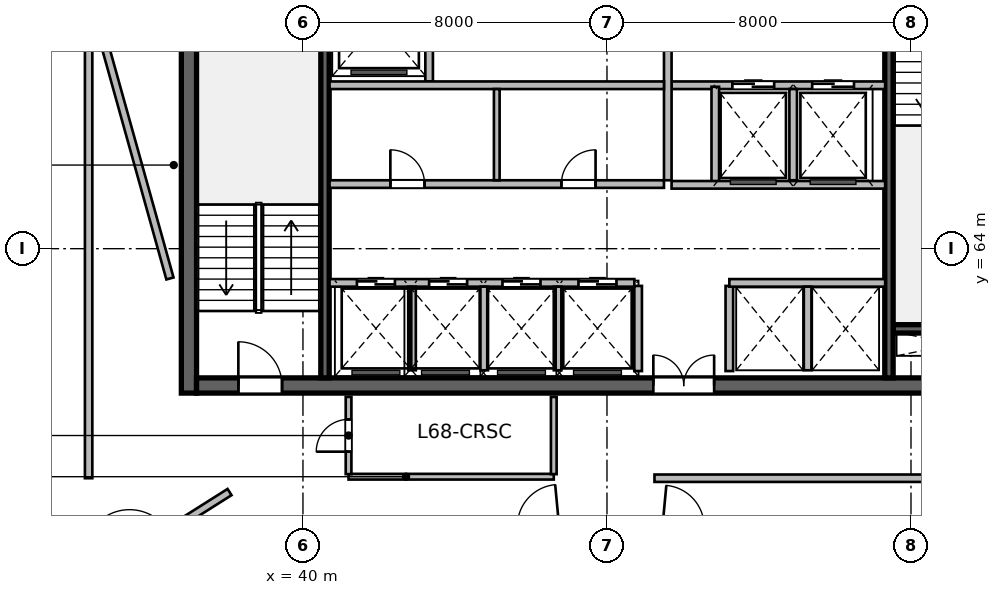
"""IFC4 building model, lengths in metres.
Left out: names, types, materials, properties, quantities, classifications, styles, units other than length and angle.
Written with IfcOpenShell. Run it as: python <this file> out.ifc"""

import sys

from ifc_helpers import new_model, si_unit, direction, frame, frame_2d, origin, place, context, subcontext, project, spatial, rectangle, extrude, source, transform, mapped, element, fill, save


model = new_model("IFC4")
c1 = context("Model", 3, precision=1e-05, world=origin(), true_north=direction((0.0, 1.0)))
c2 = subcontext(c1, "Body", "Model", "MODEL_VIEW")
j1 = project(units=[si_unit("LENGTHUNIT", "METRE"), si_unit("PLANEANGLEUNIT", "RADIAN")], contexts=[c1])
p1 = place(None, origin())
s1 = spatial("IfcSite", under=j1, at=p1, CompositionType="ELEMENT")
p2 = place(p1, origin())
s2 = spatial("IfcBuilding", under=s1, at=p2, CompositionType="ELEMENT")
p3 = place(p2, frame((0.0, 0.0, 279.6)))
s3 = spatial("IfcBuildingStorey", under=s2, at=p3, CompositionType="ELEMENT", Elevation=279.6)
m1 = source(origin(), c2, "Body", "SweptSolid", [
    extrude(rectangle(XDim=12.0, YDim=0.4, at=frame_2d((6.0, 0.0))), origin(), (0.0, 0.0, 1.0), 3.9),
])
p4 = place(p3, frame((37.0, 60.2, 0.0), z_axis=(0.0, 0.0, 1.0), x_axis=(0.0, 1.0, 0.0)))
e1 = element("IfcWall", 1, at=p4, inside=s3, PredefinedType="SHEAR", context=c2, shape_type="MappedRepresentation", body=[
    mapped(m1, transform((0.0, 0.0, 0.0), scale=1.0)),
])
m2 = source(origin(), c2, "Body", "SweptSolid", [
    extrude(rectangle(XDim=21.6, YDim=0.4, at=frame_2d((10.8, 0.0))), origin(), (0.0, 0.0, 1.0), 3.9),
])
p5 = place(p3, frame((37.2, 60.4, 0.0), z_axis=(0.0, 0.0, 1.0), x_axis=(1.0, 0.0, 0.0)))
e2 = element("IfcWall", 2, at=p5, inside=s3, PredefinedType="SHEAR", context=c2, shape_type="MappedRepresentation", body=[
    mapped(m2, transform((0.0, 0.0, 0.0), scale=1.0)),
])
p6 = place(p5, frame((1.1, 0.0, 0.0)))
e3 = element("IfcOpeningElement", 3, at=p6, cuts=e2, PredefinedType="OPENING", context=c2, shape_type="SweptSolid", body=[
    extrude(rectangle(XDim=1.15, YDim=2.15, at=frame_2d((0.575, 1.075))), frame((0.0, 0.21, 0.0), z_axis=(0.0, -1.0, 0.0), x_axis=(1.0, 0.0, 0.0)), (0.0, 0.0, 1.0), 0.42),
])
p7 = place(p5, frame((19.5, 0.0, 0.0)))
e4 = element("IfcOpeningElement", 4, at=p7, cuts=e2, PredefinedType="OPENING", context=c2, shape_type="SweptSolid", body=[
    extrude(rectangle(XDim=0.9, YDim=2.1, at=frame_2d((0.45, 1.05))), frame((0.0, 0.21, 0.0), z_axis=(0.0, -1.0, 0.0), x_axis=(1.0, 0.0, 0.0)), (0.0, 0.0, 1.0), 0.42),
])
p8 = place(p5, frame((12.02, 0.0, 0.0)))
e5 = element("IfcOpeningElement", 5, at=p8, cuts=e2, PredefinedType="OPENING", context=c2, shape_type="SweptSolid", body=[
    extrude(rectangle(XDim=1.6, YDim=2.15, at=frame_2d((0.8, 1.075))), frame((0.0, 0.21, 0.0), z_axis=(0.0, -1.0, 0.0), x_axis=(1.0, 0.0, 0.0)), (0.0, 0.0, 1.0), 0.42),
])
m3 = source(origin(), c2, "Body", "SweptSolid", [
    extrude(rectangle(XDim=3.27, YDim=0.22, at=frame_2d((1.635, 0.0))), origin(), (0.0, 0.0, 1.0), 3.9),
])
p9 = place(p3, frame((55.53, 61.89, 0.0), z_axis=(0.0, 0.0, 1.0), x_axis=(1.0, 0.0, 0.0)))
e6 = element("IfcWall", 6, at=p9, inside=s3, PredefinedType="SHEAR", context=c2, shape_type="MappedRepresentation", body=[
    mapped(m3, transform((0.0, 0.0, 0.0), scale=1.0)),
])
m4 = source(origin(), c2, "Body", "SweptSolid", [
    extrude(rectangle(XDim=11.2, YDim=0.22, at=frame_2d((5.6, 0.0))), origin(), (0.0, 0.0, 1.0), 3.9),
])
p10 = place(p3, frame((40.58, 60.6, 0.0), z_axis=(0.0, 0.0, 1.0), x_axis=(0.0, 1.0, 0.0)))
e7 = element("IfcWall", 7, at=p10, inside=s3, PredefinedType="SHEAR", context=c2, shape_type="MappedRepresentation", body=[
    mapped(m4, transform((0.0, 0.0, 0.0), scale=1.0)),
])
p11 = place(p3, frame((55.42, 60.6, 0.0), z_axis=(0.0, 0.0, 1.0), x_axis=(0.0, 1.0, 0.0)))
e8 = element("IfcWall", 8, at=p11, inside=s3, PredefinedType="SHEAR", context=c2, shape_type="MappedRepresentation", body=[
    mapped(m4, transform((0.0, 0.0, 0.0), scale=1.0)),
])
p12 = place(p11, frame((9.645, 0.0, 0.0)))
e9 = element("IfcOpeningElement", 9, at=p12, cuts=e8, PredefinedType="OPENING", context=c2, shape_type="SweptSolid", body=[
    extrude(rectangle(XDim=1.15, YDim=2.15, at=frame_2d((0.575, 1.075))), frame((0.0, 0.12, 0.0), z_axis=(0.0, -1.0, 0.0), x_axis=(1.0, 0.0, 0.0)), (0.0, 0.0, 1.0), 0.24),
])
m5 = source(origin(), c2, "Body", "SweptSolid", [
    extrude(rectangle(XDim=2.24, YDim=0.2, at=frame_2d((1.12, 0.0))), origin(), (0.0, 0.0, 1.0), 3.64),
])
for number, where, z_axis, x_axis in (
    (10, (48.82, 60.78, 0.0), (0.0, 0.0, 1.0), (0.0, 1.0, 0.0)),
    (11, (51.22, 60.78, 0.0), (0.0, 0.0, 1.0), (0.0, 1.0, 0.0)),
):
    element("IfcWall", number, at=place(p3, frame(where, z_axis=z_axis, x_axis=x_axis)), inside=s3, PredefinedType="SOLIDWALL", context=c2, shape_type="MappedRepresentation", body=[
        mapped(m5, transform((0.0, 0.0, 0.0), scale=1.0)),
    ])
m6 = source(origin(), c2, "Body", "SweptSolid", [
    extrude(rectangle(XDim=5.62, YDim=0.2, at=frame_2d((2.81, 0.0))), origin(), (0.0, 0.0, 1.0), 3.64),
])
p13 = place(p3, frame((49.7, 68.3, 0.0), z_axis=(0.0, 0.0, 1.0), x_axis=(1.0, 0.0, 0.0)))
e12 = element("IfcWall", 12, at=p13, inside=s3, PredefinedType="SOLIDWALL", context=c2, shape_type="MappedRepresentation", body=[
    mapped(m6, transform((0.0, 0.0, 0.0), scale=1.0)),
])
p14 = place(p13, frame((1.6, 0.0, 0.0)))
e13 = element("IfcOpeningElement", 13, at=p14, cuts=e12, PredefinedType="OPENING", context=c2, shape_type="SweptSolid", body=[
    extrude(rectangle(XDim=1.1, YDim=2.15, at=frame_2d((0.55, 1.075))), frame((0.0, 0.11, 0.0), z_axis=(0.0, -1.0, 0.0), x_axis=(1.0, 0.0, 0.0)), (0.0, 0.0, 1.0), 0.22),
])
p15 = place(p13, frame((3.7, 0.0, 0.0)))
e14 = element("IfcOpeningElement", 14, at=p15, cuts=e12, PredefinedType="OPENING", context=c2, shape_type="SweptSolid", body=[
    extrude(rectangle(XDim=1.1, YDim=2.15, at=frame_2d((0.55, 1.075))), frame((0.0, 0.11, 0.0), z_axis=(0.0, -1.0, 0.0), x_axis=(1.0, 0.0, 0.0)), (0.0, 0.0, 1.0), 0.22),
])
m7 = source(origin(), c2, "Body", "SweptSolid", [
    extrude(rectangle(XDim=5.8, YDim=0.2, at=frame_2d((2.9, 0.0))), origin(), (0.0, 0.0, 1.0), 3.64),
])
p16 = place(p3, frame((49.6, 65.8, 0.0), z_axis=(0.0, 0.0, 1.0), x_axis=(0.0, 1.0, 0.0)))
e15 = element("IfcWall", 15, at=p16, inside=s3, PredefinedType="SOLIDWALL", context=c2, shape_type="MappedRepresentation", body=[
    mapped(m7, transform((0.0, 0.0, 0.0), scale=1.0)),
])
m8 = source(origin(), c2, "Body", "SweptSolid", [
    extrude(rectangle(XDim=2.58, YDim=0.2, at=frame_2d((1.29, 0.0))), origin(), (0.0, 0.0, 1.0), 3.64),
])
p17 = place(p3, frame((50.85, 65.68, 0.0), z_axis=(0.0, 0.0, 1.0), x_axis=(0.0, 1.0, 0.0)))
e16 = element("IfcWall", 16, at=p17, inside=s3, PredefinedType="SOLIDWALL", context=c2, shape_type="MappedRepresentation", body=[
    mapped(m8, transform((0.0, 0.0, 0.0), scale=1.0)),
])
m9 = source(origin(), c2, "Body", "SweptSolid", [
    extrude(rectangle(XDim=2.4, YDim=0.2, at=frame_2d((1.2, 0.0))), origin(), (0.0, 0.0, 1.0), 3.64),
])
p18 = place(p3, frame((52.9, 65.8, 0.0), z_axis=(0.0, 0.0, 1.0), x_axis=(0.0, 1.0, 0.0)))
e17 = element("IfcWall", 17, at=p18, inside=s3, PredefinedType="SOLIDWALL", context=c2, shape_type="MappedRepresentation", body=[
    mapped(m9, transform((0.0, 0.0, 0.0), scale=1.0)),
])
p19 = place(p3, frame((49.7, 65.68, 0.0), z_axis=(0.0, 0.0, 1.0), x_axis=(1.0, 0.0, 0.0)))
e18 = element("IfcWall", 18, at=p19, inside=s3, PredefinedType="SOLIDWALL", context=c2, shape_type="MappedRepresentation", body=[
    mapped(m6, transform((0.0, 0.0, 0.0), scale=1.0)),
])
m10 = source(origin(), c2, "Body", "SweptSolid", [
    extrude(rectangle(XDim=3.2, YDim=0.2, at=frame_2d((1.6, 0.0))), origin(), (0.0, 0.0, 1.0), 3.64),
])
p20 = place(p3, frame((43.32, 68.4, 0.0), z_axis=(0.0, 0.0, 1.0), x_axis=(0.0, 1.0, 0.0)))
e19 = element("IfcWall", 19, at=p20, inside=s3, PredefinedType="SOLIDWALL", context=c2, shape_type="MappedRepresentation", body=[
    mapped(m10, transform((0.0, 0.0, 0.0), scale=1.0)),
])
m11 = source(origin(), c2, "Body", "SweptSolid", [
    extrude(rectangle(XDim=8.8, YDim=0.2, at=frame_2d((4.4, 0.0))), origin(), (0.0, 0.0, 1.0), 3.64),
])
p21 = place(p3, frame((40.7, 68.3, 0.0), z_axis=(0.0, 0.0, 1.0), x_axis=(1.0, 0.0, 0.0)))
e20 = element("IfcWall", 20, at=p21, inside=s3, PredefinedType="SOLIDWALL", context=c2, shape_type="MappedRepresentation", body=[
    mapped(m11, transform((0.0, 0.0, 0.0), scale=1.0)),
])
m12 = source(origin(), c2, "Body", "SweptSolid", [
    extrude(rectangle(XDim=8.02, YDim=0.2, at=frame_2d((4.01, 0.0))), origin(), (0.0, 0.0, 1.0), 3.64),
])
p22 = place(p3, frame((40.7, 63.1, 0.0), z_axis=(0.0, 0.0, 1.0), x_axis=(1.0, 0.0, 0.0)))
e21 = element("IfcWall", 21, at=p22, inside=s3, PredefinedType="SOLIDWALL", context=c2, shape_type="MappedRepresentation", body=[
    mapped(m12, transform((0.0, 0.0, 0.0), scale=1.0)),
])
p23 = place(p22, frame((0.72, 0.0, 0.0)))
e22 = element("IfcOpeningElement", 22, at=p23, cuts=e21, PredefinedType="OPENING", context=c2, shape_type="SweptSolid", body=[
    extrude(rectangle(XDim=1.0, YDim=2.15, at=frame_2d((0.5, 1.075))), frame((0.0, 0.11, 0.0), z_axis=(0.0, -1.0, 0.0), x_axis=(1.0, 0.0, 0.0)), (0.0, 0.0, 1.0), 0.22),
])
p24 = place(p22, frame((2.62, 0.0, 0.0)))
e23 = element("IfcOpeningElement", 23, at=p24, cuts=e21, PredefinedType="OPENING", context=c2, shape_type="SweptSolid", body=[
    extrude(rectangle(XDim=1.0, YDim=2.15, at=frame_2d((0.5, 1.075))), frame((0.0, 0.11, 0.0), z_axis=(0.0, -1.0, 0.0), x_axis=(1.0, 0.0, 0.0)), (0.0, 0.0, 1.0), 0.22),
])
p25 = place(p22, frame((4.55, 0.0, 0.0)))
e24 = element("IfcOpeningElement", 24, at=p25, cuts=e21, PredefinedType="OPENING", context=c2, shape_type="SweptSolid", body=[
    extrude(rectangle(XDim=1.0, YDim=2.15, at=frame_2d((0.5, 1.075))), frame((0.0, 0.11, 0.0), z_axis=(0.0, -1.0, 0.0), x_axis=(1.0, 0.0, 0.0)), (0.0, 0.0, 1.0), 0.22),
])
p26 = place(p22, frame((6.55, 0.0, 0.0)))
e25 = element("IfcOpeningElement", 25, at=p26, cuts=e21, PredefinedType="OPENING", context=c2, shape_type="SweptSolid", body=[
    extrude(rectangle(XDim=1.0, YDim=2.15, at=frame_2d((0.5, 1.075))), frame((0.0, 0.11, 0.0), z_axis=(0.0, -1.0, 0.0), x_axis=(1.0, 0.0, 0.0)), (0.0, 0.0, 1.0), 0.22),
])
m13 = source(origin(), c2, "Body", "SweptSolid", [
    extrude(rectangle(XDim=4.1, YDim=0.2, at=frame_2d((2.05, 0.0))), origin(), (0.0, 0.0, 1.0), 3.64),
])
p27 = place(p3, frame((51.22, 63.1, 0.0), z_axis=(0.0, 0.0, 1.0), x_axis=(1.0, 0.0, 0.0)))
e26 = element("IfcWall", 26, at=p27, inside=s3, PredefinedType="SOLIDWALL", context=c2, shape_type="MappedRepresentation", body=[
    mapped(m13, transform((0.0, 0.0, 0.0), scale=1.0)),
])
m14 = source(origin(), c2, "Body", "SweptSolid", [
    extrude(rectangle(XDim=2.2, YDim=0.2, at=frame_2d((1.1, 0.0))), origin(), (0.0, 0.0, 1.0), 3.64),
])
for number, where, z_axis, x_axis in (
    (27, (42.87, 60.8, 0.0), (0.0, 0.0, 1.0), (0.0, 1.0, 0.0)),
    (28, (44.77, 60.8, 0.0), (0.0, 0.0, 1.0), (0.0, 1.0, 0.0)),
    (29, (46.7, 60.8, 0.0), (0.0, 0.0, 1.0), (0.0, 1.0, 0.0)),
    (30, (53.28, 60.8, 0.0), (0.0, 0.0, 1.0), (0.0, 1.0, 0.0)),
):
    element("IfcWall", number, at=place(p3, frame(where, z_axis=z_axis, x_axis=x_axis)), inside=s3, PredefinedType="SOLIDWALL", context=c2, shape_type="MappedRepresentation", body=[
        mapped(m14, transform((0.0, 0.0, 0.0), scale=1.0)),
    ])
p28 = place(p3, frame((40.7, 65.7, 0.0), z_axis=(0.0, 0.0, 1.0), x_axis=(1.0, 0.0, 0.0)))
e31 = element("IfcWall", 31, at=p28, inside=s3, PredefinedType="SOLIDWALL", context=c2, shape_type="MappedRepresentation", body=[
    mapped(m11, transform((0.0, 0.0, 0.0), scale=1.0)),
])
p29 = place(p28, frame((1.6, 0.0, 0.0)))
e32 = element("IfcOpeningElement", 32, at=p29, cuts=e31, PredefinedType="OPENING", context=c2, shape_type="SweptSolid", body=[
    extrude(rectangle(XDim=0.9, YDim=2.1, at=frame_2d((0.45, 1.05))), frame((0.0, 0.11, 0.0), z_axis=(0.0, -1.0, 0.0), x_axis=(1.0, 0.0, 0.0)), (0.0, 0.0, 1.0), 0.22),
])
p30 = place(p28, frame((6.1, 0.0, 0.0)))
e33 = element("IfcOpeningElement", 33, at=p30, cuts=e31, PredefinedType="OPENING", context=c2, shape_type="SweptSolid", body=[
    extrude(rectangle(XDim=0.9, YDim=2.1, at=frame_2d((0.45, 1.05))), frame((0.0, 0.11, 0.0), z_axis=(0.0, -1.0, 0.0), x_axis=(1.0, 0.0, 0.0)), (0.0, 0.0, 1.0), 0.22),
])
m15 = source(origin(), c2, "Body", "SweptSolid", [
    extrude(rectangle(XDim=2.4, YDim=0.15, at=frame_2d((1.2, 0.0))), origin(), (0.0, 0.0, 1.0), 3.64),
])
p31 = place(p3, frame((45.1, 65.8, 0.0), z_axis=(0.0, 0.0, 1.0), x_axis=(0.0, 1.0, 0.0)))
e34 = element("IfcWall", 34, at=p31, inside=s3, PredefinedType="PARTITIONING", context=c2, shape_type="MappedRepresentation", body=[
    mapped(m15, transform((0.0, 0.0, 0.0), scale=1.0)),
])
m16 = source(origin(), c2, "Body", "SweptSolid", [
    extrude(rectangle(XDim=5.4, YDim=0.15, at=frame_2d((2.7, 0.0))), origin(), (0.0, 0.0, 1.0), 3.64),
])
p32 = place(p3, frame((41.2, 58.0, 0.0), z_axis=(0.0, 0.0, 1.0), x_axis=(1.0, 0.0, 0.0)))
e35 = element("IfcWall", 35, at=p32, inside=s3, PredefinedType="PARTITIONING", context=c2, shape_type="MappedRepresentation", body=[
    mapped(m16, transform((0.0, 0.0, 0.0), scale=1.0)),
])
m17 = source(origin(), c2, "Body", "SweptSolid", [
    extrude(rectangle(XDim=2.033, YDim=0.15, at=frame_2d((1.016, 0.0))), origin(), (0.0, 0.0, 1.0), 3.64),
])
p33 = place(p3, frame((41.2, 58.067, 0.0), z_axis=(0.0, 0.0, 1.0), x_axis=(0.0, 1.0, 0.0)))
e36 = element("IfcWall", 36, at=p33, inside=s3, PredefinedType="PARTITIONING", context=c2, shape_type="MappedRepresentation", body=[
    mapped(m17, transform((0.0, 0.0, 0.0), scale=1.0)),
])
p34 = place(p33, frame((0.591, 0.0, 0.0)))
e37 = element("IfcOpeningElement", 37, at=p34, cuts=e36, PredefinedType="OPENING", context=c2, shape_type="SweptSolid", body=[
    extrude(rectangle(XDim=0.85, YDim=2.1, at=frame_2d((0.425, 1.05))), frame((0.0, 0.085, 0.0), z_axis=(0.0, -1.0, 0.0), x_axis=(1.0, 0.0, 0.0)), (0.0, 0.0, 1.0), 0.17),
])
p35 = place(p3, frame((46.6, 58.067, 0.0), z_axis=(0.0, 0.0, 1.0), x_axis=(0.0, 1.0, 0.0)))
e38 = element("IfcWall", 38, at=p35, inside=s3, PredefinedType="PARTITIONING", context=c2, shape_type="MappedRepresentation", body=[
    mapped(m17, transform((0.0, 0.0, 0.0), scale=1.0)),
])
m18 = source(origin(), c2, "Body", "SweptSolid", [
    extrude(rectangle(XDim=17.556, YDim=0.195, at=frame_2d((8.778, 0.0))), origin(), (0.0, 0.0, 1.0), 3.64),
])
p36 = place(p3, frame((33.8, 54.958, 0.0), z_axis=(0.0, 0.0, 1.0), x_axis=(-0.395687598313, 0.918385172213, 0.0)))
e39 = element("IfcWall", 39, at=p36, inside=s3, PredefinedType="PARTITIONING", context=c2, shape_type="MappedRepresentation", body=[
    mapped(m18, transform((0.0, 0.0, 0.0), scale=1.0)),
])
m19 = source(origin(), c2, "Body", "SweptSolid", [
    extrude(rectangle(XDim=5.025, YDim=0.195, at=frame_2d((2.513, 0.0))), origin(), (0.0, 0.0, 1.0), 3.64),
])
p37 = place(p3, frame((33.82, 54.911, 0.0), z_axis=(0.0, 0.0, 1.0), x_axis=(0.84532378062, 0.534254345717, 0.0)))
e40 = element("IfcWall", 40, at=p37, inside=s3, PredefinedType="PARTITIONING", context=c2, shape_type="MappedRepresentation", body=[
    mapped(m19, transform((0.0, 0.0, 0.0), scale=1.0)),
])
p38 = place(p37, frame((1.913, 0.0, 0.0)))
e41 = element("IfcOpeningElement", 41, at=p38, cuts=e40, PredefinedType="OPENING", context=c2, shape_type="SweptSolid", body=[
    extrude(rectangle(XDim=1.2, YDim=2.15, at=frame_2d((0.6, 1.075))), frame((0.0, 0.107, 0.0), z_axis=(0.0, -1.0, 0.0), x_axis=(1.0, 0.0, 0.0)), (0.0, 0.0, 1.0), 0.215),
])
m20 = source(origin(), c2, "Body", "SweptSolid", [
    extrude(rectangle(XDim=12.311, YDim=0.195, at=frame_2d((6.155, 0.0))), origin(), (0.0, 0.0, 1.0), 3.64),
])
p39 = place(p3, frame((36.5, 63.216, 0.0), z_axis=(0.0, 0.0, 1.0), x_axis=(-0.268759602651, 0.963207286093, 0.0)))
e42 = element("IfcWall", 42, at=p39, inside=s3, PredefinedType="PARTITIONING", context=c2, shape_type="MappedRepresentation", body=[
    mapped(m20, transform((0.0, 0.0, 0.0), scale=1.0)),
])
m21 = source(origin(), c2, "Body", "SweptSolid", [
    extrude(rectangle(XDim=17.681, YDim=0.195, at=frame_2d((8.84, 0.0))), origin(), (0.0, 0.0, 1.0), 3.64),
])
p40 = place(p3, frame((34.36, 57.96, 0.0), z_axis=(0.0, 0.0, 1.0), x_axis=(0.0, 1.0, 0.0)))
e43 = element("IfcWall", 43, at=p40, inside=s3, PredefinedType="PARTITIONING", context=c2, shape_type="MappedRepresentation", body=[
    mapped(m21, transform((0.0, 0.0, 0.0), scale=1.0)),
])
m22 = source(origin(), c2, "Body", "SweptSolid", [
    extrude(rectangle(XDim=12.39, YDim=0.195, at=frame_2d((6.195, 0.0))), origin(), (0.0, 0.0, 1.0), 3.64),
])
p41 = place(p3, frame((49.25, 57.96, 0.0), z_axis=(0.0, 0.0, 1.0), x_axis=(1.0, 0.0, 0.0)))
e44 = element("IfcWall", 44, at=p41, inside=s3, PredefinedType="PARTITIONING", context=c2, shape_type="MappedRepresentation", body=[
    mapped(m22, transform((0.0, 0.0, 0.0), scale=1.0)),
])
m23 = source(origin(), c2, "Body", "SweptSolid", [
    extrude(rectangle(XDim=1.15, YDim=2.15, at=frame_2d((0.575, 1.075))), frame((0.0, 0.025, 0.0), z_axis=(0.0, -1.0, 0.0), x_axis=(1.0, 0.0, 0.0)), (0.0, 0.0, 1.0), 0.05),
])
p42 = place(p6, origin())
e45 = element("IfcDoor", 45, at=p42, inside=s3, OperationType="SINGLE_SWING_LEFT", PredefinedType="DOOR", context=c2, shape_type="MappedRepresentation", body=[
    mapped(m23, transform((0.0, 0.0, 0.0), scale=1.0)),
])
fill(e3, e45)
m24 = source(origin(), c2, "Body", "SweptSolid", [
    extrude(rectangle(XDim=1.6, YDim=2.15, at=frame_2d((0.8, 1.075))), frame((0.0, 0.025, 0.0), z_axis=(0.0, -1.0, 0.0), x_axis=(1.0, 0.0, 0.0)), (0.0, 0.0, 1.0), 0.05),
])
p43 = place(p8, origin())
e46 = element("IfcDoor", 46, at=p43, inside=s3, OperationType="DOUBLE_DOOR_SINGLE_SWING", PredefinedType="DOOR", context=c2, shape_type="MappedRepresentation", body=[
    mapped(m24, transform((0.0, 0.0, 0.0), scale=1.0)),
])
fill(e5, e46)
m25 = source(origin(), c2, "Body", "SweptSolid", [
    extrude(rectangle(XDim=1.1, YDim=2.15, at=frame_2d((0.55, 1.075))), frame((0.0, 0.025, 0.0), z_axis=(0.0, -1.0, 0.0), x_axis=(1.0, 0.0, 0.0)), (0.0, 0.0, 1.0), 0.05),
])
p44 = place(p14, origin())
e47 = element("IfcDoor", 47, at=p44, inside=s3, OperationType="DOUBLE_DOOR_SLIDING", PredefinedType="DOOR", context=c2, shape_type="MappedRepresentation", body=[
    mapped(m25, transform((0.0, 0.0, 0.0), scale=1.0)),
])
fill(e13, e47)
p45 = place(p15, origin())
e48 = element("IfcDoor", 48, at=p45, inside=s3, OperationType="DOUBLE_DOOR_SLIDING", PredefinedType="DOOR", context=c2, shape_type="MappedRepresentation", body=[
    mapped(m25, transform((0.0, 0.0, 0.0), scale=1.0)),
])
fill(e14, e48)
m26 = source(origin(), c2, "Body", "SweptSolid", [
    extrude(rectangle(XDim=1.0, YDim=2.15, at=frame_2d((0.5, 1.075))), frame((0.0, 0.025, 0.0), z_axis=(0.0, -1.0, 0.0), x_axis=(1.0, 0.0, 0.0)), (0.0, 0.0, 1.0), 0.05),
])
p46 = place(p23, origin())
e49 = element("IfcDoor", 49, at=p46, inside=s3, OperationType="DOUBLE_DOOR_SLIDING", PredefinedType="DOOR", context=c2, shape_type="MappedRepresentation", body=[
    mapped(m26, transform((0.0, 0.0, 0.0), scale=1.0)),
])
fill(e22, e49)
p47 = place(p24, origin())
e50 = element("IfcDoor", 50, at=p47, inside=s3, OperationType="DOUBLE_DOOR_SLIDING", PredefinedType="DOOR", context=c2, shape_type="MappedRepresentation", body=[
    mapped(m26, transform((0.0, 0.0, 0.0), scale=1.0)),
])
fill(e23, e50)
p48 = place(p25, origin())
e51 = element("IfcDoor", 51, at=p48, inside=s3, OperationType="DOUBLE_DOOR_SLIDING", PredefinedType="DOOR", context=c2, shape_type="MappedRepresentation", body=[
    mapped(m26, transform((0.0, 0.0, 0.0), scale=1.0)),
])
fill(e24, e51)
p49 = place(p26, origin())
e52 = element("IfcDoor", 52, at=p49, inside=s3, OperationType="DOUBLE_DOOR_SLIDING", PredefinedType="DOOR", context=c2, shape_type="MappedRepresentation", body=[
    mapped(m26, transform((0.0, 0.0, 0.0), scale=1.0)),
])
fill(e25, e52)
m27 = source(origin(), c2, "Body", "SweptSolid", [
    extrude(rectangle(XDim=0.9, YDim=2.1, at=frame_2d((0.45, 1.05))), frame((0.0, 0.025, 0.0), z_axis=(0.0, -1.0, 0.0), x_axis=(1.0, 0.0, 0.0)), (0.0, 0.0, 1.0), 0.05),
])
p50 = place(p29, origin())
e53 = element("IfcDoor", 53, at=p50, inside=s3, OperationType="SINGLE_SWING_LEFT", PredefinedType="DOOR", context=c2, shape_type="MappedRepresentation", body=[
    mapped(m27, transform((0.0, 0.0, 0.0), scale=1.0)),
])
fill(e32, e53)
p51 = place(p30, origin())
e54 = element("IfcDoor", 54, at=p51, inside=s3, OperationType="SINGLE_SWING_RIGHT", PredefinedType="DOOR", context=c2, shape_type="MappedRepresentation", body=[
    mapped(m27, transform((0.0, 0.0, 0.0), scale=1.0)),
])
fill(e33, e54)
m28 = source(origin(), c2, "Body", "SweptSolid", [
    extrude(rectangle(XDim=0.85, YDim=2.1, at=frame_2d((0.425, 1.05))), frame((0.0, 0.025, 0.0), z_axis=(0.0, -1.0, 0.0), x_axis=(1.0, 0.0, 0.0)), (0.0, 0.0, 1.0), 0.05),
])
p52 = place(p34, origin())
e55 = element("IfcDoor", 55, at=p52, inside=s3, OperationType="SINGLE_SWING_LEFT", PredefinedType="DOOR", context=c2, shape_type="MappedRepresentation", body=[
    mapped(m28, transform((0.0, 0.0, 0.0), scale=1.0)),
])
fill(e37, e55)
save(model, sys.argv[1])
